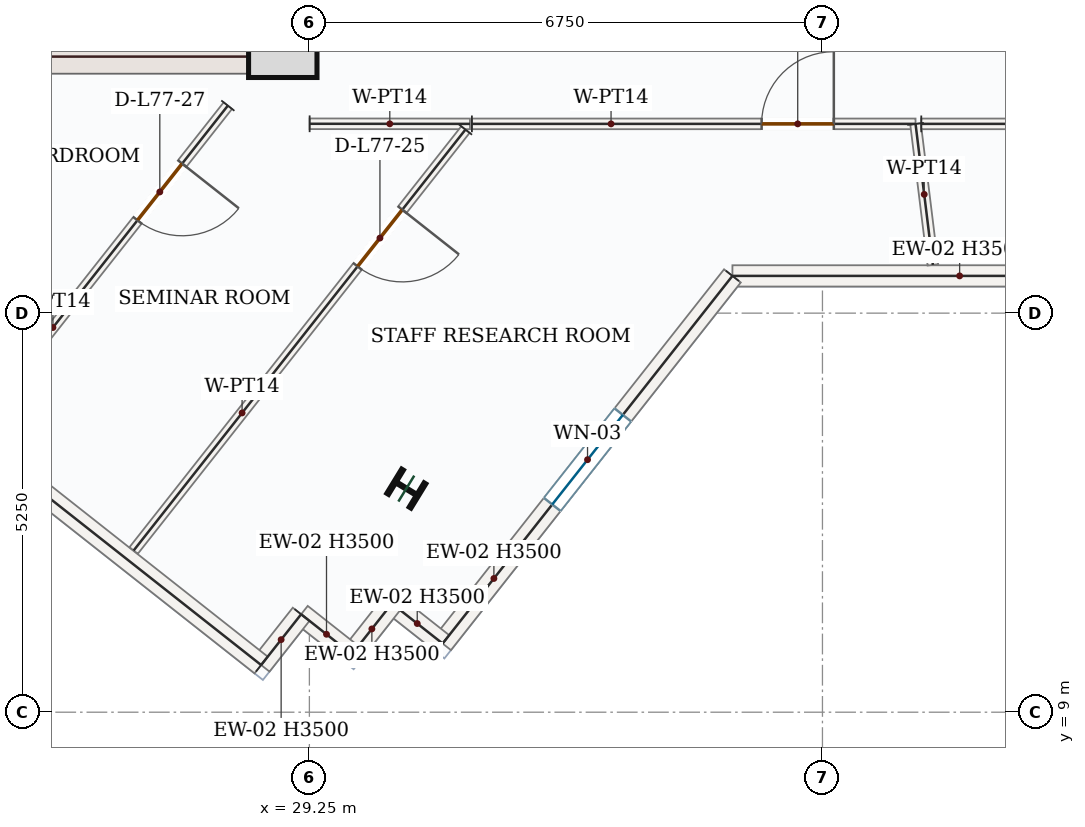
"""IFC4 building model, lengths in metres.
Left out: names, types, materials, properties, quantities, classifications, styles, units other than length and angle.
Written with IfcOpenShell. Run it as: python <this file> out.ifc"""

import sys

from ifc_helpers import new_model, si_unit, direction, frame, frame_2d, origin, origin_2d, place, context, subcontext, project, spatial, rectangle, i_section, extrude, source, transform, mapped, element, fill, save


model = new_model("IFC4")
c1 = context("Model", 3, precision=1e-05, world=origin(), true_north=direction((0.0, 1.0)))
c2 = subcontext(c1, "Body", "Model", "MODEL_VIEW")
j1 = project(units=[si_unit("LENGTHUNIT", "METRE"), si_unit("PLANEANGLEUNIT", "RADIAN")], contexts=[c1])
p1 = place(None, origin())
s1 = spatial("IfcSite", under=j1, at=p1, CompositionType="ELEMENT")
p2 = place(p1, origin())
s2 = spatial("IfcBuilding", under=s1, at=p2, CompositionType="ELEMENT")
p3 = place(p2, frame((0.0, 0.0, 319.8)))
s3 = spatial("IfcBuildingStorey", under=s2, at=p3, CompositionType="ELEMENT", Elevation=319.8)
p4 = place(p3, frame((29.025, 17.4, 0.0), z_axis=(0.0, 0.0, 1.0), x_axis=(0.0, 1.0, 0.0)))
e1 = element("IfcWall", 1, at=p4, inside=s3, PredefinedType="SHEAR", context=c2, shape_type="SweptSolid", body=[
    extrude(rectangle(XDim=8.55, YDim=0.45, at=frame_2d((4.275, 0.0))), origin(), (0.0, 0.0, 1.0), 3.5),
])
p5 = place(p4, frame((6.65, 0.0, 0.0)))
e2 = element("IfcOpeningElement", 2, at=p5, cuts=e1, PredefinedType="OPENING", context=c2, shape_type="SweptSolid", body=[
    extrude(rectangle(XDim=1.1, YDim=2.2, at=frame_2d((0.55, 1.1))), frame((0.0, 0.235, 0.0), z_axis=(0.0, -1.0, 0.0), x_axis=(1.0, 0.0, 0.0)), (0.0, 0.0, 1.0), 0.47),
])
p6 = place(p4, frame((3.15, 0.0, 0.0)))
e3 = element("IfcOpeningElement", 3, at=p6, cuts=e1, PredefinedType="OPENING", context=c2, shape_type="SweptSolid", body=[
    extrude(rectangle(XDim=0.88, YDim=2.1, at=frame_2d((0.44, 1.05))), frame((0.0, 0.235, 0.0), z_axis=(0.0, -1.0, 0.0), x_axis=(1.0, 0.0, 0.0)), (0.0, 0.0, 1.0), 0.47),
])
m1 = source(origin(), c2, "Body", "SweptSolid", [
    extrude(rectangle(XDim=7.1, YDim=0.45, at=frame_2d((3.55, 0.0))), origin(), (0.0, 0.0, 1.0), 3.5),
])
p7 = place(p3, frame((21.7, 17.625, 0.0), z_axis=(0.0, 0.0, 1.0), x_axis=(1.0, 0.0, 0.0)))
e4 = element("IfcWall", 4, at=p7, inside=s3, PredefinedType="SHEAR", context=c2, shape_type="MappedRepresentation", body=[
    mapped(m1, transform((0.0, 0.0, 0.0), x_axis=(1.0, 0.0, 0.0), y_axis=(0.0, 1.0, 0.0), z_axis=(0.0, 0.0, 1.0), scale=1.0)),
])
m2 = source(origin(), c2, "Body", "SweptSolid", [
    extrude(rectangle(XDim=0.9, YDim=0.9, at=origin_2d()), origin(), (0.0, 0.0, 1.0), 3.75),
])
p8 = place(p3, frame((28.9, 17.8, 0.0), z_axis=(0.0, 0.0, 1.0), x_axis=(1.0, 0.0, 0.0)))
e5 = element("IfcColumn", 5, at=p8, inside=s3, PredefinedType="COLUMN", context=c2, shape_type="MappedRepresentation", body=[
    mapped(m2, transform((0.0, 0.0, 0.0), x_axis=(1.0, 0.0, 0.0), y_axis=(0.0, 1.0, 0.0), z_axis=(0.0, 0.0, 1.0), scale=1.0)),
])
m3 = source(origin(), c2, "Body", "SweptSolid", [
    extrude(i_section(OverallWidth=0.374, OverallDepth=0.372, WebThickness=0.016, FlangeThickness=0.026, FilletRadius=0.018, at=origin_2d()), origin(), (0.0, 0.0, 1.0), 3.75),
])
p9 = place(p3, frame((30.525, 11.942, 0.0), z_axis=(0.0, 0.0, 1.0), x_axis=(0.522498564716, 0.852640164354, 0.0)))
e6 = element("IfcColumn", 6, at=p9, inside=s3, PredefinedType="COLUMN", context=c2, shape_type="MappedRepresentation", body=[
    mapped(m3, transform((0.0, 0.0, 0.0), x_axis=(1.0, 0.0, 0.0), y_axis=(0.0, 1.0, 0.0), z_axis=(0.0, 0.0, 1.0), scale=1.0)),
])
m4 = source(origin(), c2, "Body", "SweptSolid", [
    extrude(rectangle(XDim=5.978, YDim=0.28, at=frame_2d((2.989, 0.0))), origin(), (0.0, 0.0, 1.0), 3.5),
])
p10 = place(p3, frame((40.794, 14.74, 0.0), z_axis=(0.0, 0.0, 1.0), x_axis=(-1.0, 0.0, 0.0)))
e7 = element("IfcWall", 7, at=p10, inside=s3, PredefinedType="SOLIDWALL", context=c2, shape_type="MappedRepresentation", body=[
    mapped(m4, transform((0.0, 0.0, 0.0), x_axis=(1.0, 0.0, 0.0), y_axis=(0.0, 1.0, 0.0), z_axis=(0.0, 0.0, 1.0), scale=1.0)),
])
p11 = place(p3, frame((34.816, 14.74, 0.0), z_axis=(0.0, 0.0, 1.0), x_axis=(-0.619100474058, -0.78531178714, 0.0)))
e8 = element("IfcWall", 8, at=p11, inside=s3, PredefinedType="SOLIDWALL", context=c2, shape_type="SweptSolid", body=[
    extrude(rectangle(XDim=6.159, YDim=0.28, at=frame_2d((3.08, 0.0))), origin(), (0.0, 0.0, 1.0), 3.5),
])
p12 = place(p11, frame((2.329, 0.0, 0.85)))
e9 = element("IfcOpeningElement", 9, at=p12, cuts=e8, PredefinedType="OPENING", context=c2, shape_type="SweptSolid", body=[
    extrude(rectangle(XDim=1.5, YDim=1.5, at=frame_2d((0.75, 0.75))), frame((0.0, 0.15, 0.0), z_axis=(0.0, -1.0, 0.0), x_axis=(1.0, 0.0, 0.0)), (0.0, 0.0, 1.0), 0.3),
])
m5 = source(origin(), c2, "Body", "SweptSolid", [
    extrude(rectangle(XDim=0.85, YDim=0.28, at=frame_2d((0.425, 0.0))), origin(), (0.0, 0.0, 1.0), 3.5),
])
p13 = place(p3, frame((31.003, 9.903, 0.0), z_axis=(0.0, 0.0, 1.0), x_axis=(-0.785220826193, 0.619215838066, 0.0)))
e10 = element("IfcWall", 10, at=p13, inside=s3, PredefinedType="SOLIDWALL", context=c2, shape_type="MappedRepresentation", body=[
    mapped(m5, transform((0.0, 0.0, 0.0), x_axis=(1.0, 0.0, 0.0), y_axis=(0.0, 1.0, 0.0), z_axis=(0.0, 0.0, 1.0), scale=1.0)),
])
m6 = source(origin(), c2, "Body", "SweptSolid", [
    extrude(rectangle(XDim=0.85, YDim=0.28, at=frame_2d((0.425, 0.0))), origin(), (0.0, 0.0, 1.0), 3.5),
])
for number, where, z_axis, x_axis in (
    (11, (30.335, 10.43, 0.0), (0.0, 0.0, 1.0), (-0.619, -0.785, 0.0)),
    (12, (29.809, 9.762, 0.0), (0.0, 0.0, 1.0), (-0.785, 0.619, 0.0)),
):
    element("IfcWall", number, at=place(p3, frame(where, z_axis=z_axis, x_axis=x_axis)), inside=s3, PredefinedType="SOLIDWALL", context=c2, shape_type="MappedRepresentation", body=[
        mapped(m6, transform((0.0, 0.0, 0.0), x_axis=(1.0, 0.0, 0.0), y_axis=(0.0, 1.0, 0.0), z_axis=(0.0, 0.0, 1.0), scale=1.0)),
    ])
p14 = place(p3, frame((29.142, 10.288, 0.0), z_axis=(0.0, 0.0, 1.0), x_axis=(-0.619215838066, -0.785220826193, 0.0)))
e13 = element("IfcWall", 13, at=p14, inside=s3, PredefinedType="SOLIDWALL", context=c2, shape_type="MappedRepresentation", body=[
    mapped(m5, transform((0.0, 0.0, 0.0), x_axis=(1.0, 0.0, 0.0), y_axis=(0.0, 1.0, 0.0), z_axis=(0.0, 0.0, 1.0), scale=1.0)),
])
m7 = source(origin(), c2, "Body", "SweptSolid", [
    extrude(rectangle(XDim=9.92, YDim=0.28, at=frame_2d((4.96, 0.0))), origin(), (0.0, 0.0, 1.0), 3.5),
])
p15 = place(p3, frame((28.615, 9.621, 0.0), z_axis=(0.0, 0.0, 1.0), x_axis=(-0.785317257435, 0.619093535077, 0.0)))
e14 = element("IfcWall", 14, at=p15, inside=s3, PredefinedType="SOLIDWALL", context=c2, shape_type="MappedRepresentation", body=[
    mapped(m7, transform((0.0, 0.0, 0.0), x_axis=(1.0, 0.0, 0.0), y_axis=(0.0, 1.0, 0.0), z_axis=(0.0, 0.0, 1.0), scale=1.0)),
])
p16 = place(p3, frame((28.177, 16.98, 0.0), z_axis=(0.0, 0.0, 1.0), x_axis=(-0.619105408422, -0.785307897109, 0.0)))
e15 = element("IfcWall", 15, at=p16, inside=s3, PredefinedType="PARTITIONING", context=c2, shape_type="SweptSolid", body=[
    extrude(rectangle(XDim=5.363, YDim=0.14, at=frame_2d((2.682, 0.0))), origin(), (0.0, 0.0, 1.0), 3.5),
])
p17 = place(p16, frame((0.971, 0.0, 0.0)))
e16 = element("IfcOpeningElement", 16, at=p17, cuts=e15, PredefinedType="OPENING", context=c2, shape_type="SweptSolid", body=[
    extrude(rectangle(XDim=0.95, YDim=2.15, at=frame_2d((0.475, 1.075))), frame((0.0, 0.08, 0.0), z_axis=(0.0, -1.0, 0.0), x_axis=(1.0, 0.0, 0.0)), (0.0, 0.0, 1.0), 0.16),
])
m8 = source(origin(), c2, "Body", "SweptSolid", [
    extrude(rectangle(XDim=2.109, YDim=0.14, at=frame_2d((1.054, 0.0))), origin(), (0.0, 0.0, 1.0), 3.5),
])
p18 = place(p3, frame((29.253, 16.741, 0.0), z_axis=(0.0, 0.0, 1.0), x_axis=(0.999999832474, -0.000578837597, 0.0)))
e17 = element("IfcWall", 17, at=p18, inside=s3, PredefinedType="PARTITIONING", context=c2, shape_type="MappedRepresentation", body=[
    mapped(m8, transform((0.0, 0.0, 0.0), x_axis=(1.0, 0.0, 0.0), y_axis=(0.0, 1.0, 0.0), z_axis=(0.0, 0.0, 1.0), scale=1.0)),
])
p19 = place(p3, frame((31.303, 16.665, 0.0), z_axis=(0.0, 0.0, 1.0), x_axis=(-0.619105259882, -0.785308014213, 0.0)))
e18 = element("IfcWall", 18, at=p19, inside=s3, PredefinedType="PARTITIONING", context=c2, shape_type="SweptSolid", body=[
    extrude(rectangle(XDim=7.051, YDim=0.14, at=frame_2d((3.525, 0.0))), origin(), (0.0, 0.0, 1.0), 3.5),
])
p20 = place(p19, frame((1.342, 0.0, 0.0)))
e19 = element("IfcOpeningElement", 19, at=p20, cuts=e18, PredefinedType="OPENING", context=c2, shape_type="SweptSolid", body=[
    extrude(rectangle(XDim=0.95, YDim=2.15, at=frame_2d((0.475, 1.075))), frame((0.0, 0.08, 0.0), z_axis=(0.0, -1.0, 0.0), x_axis=(1.0, 0.0, 0.0)), (0.0, 0.0, 1.0), 0.16),
])
p21 = place(p3, frame((31.388, 16.74, 0.0), z_axis=(0.0, 0.0, 1.0), x_axis=(1.0, 0.0, 0.0)))
e20 = element("IfcWall", 20, at=p21, inside=s3, PredefinedType="PARTITIONING", context=c2, shape_type="SweptSolid", body=[
    extrude(rectangle(XDim=5.837, YDim=0.14, at=frame_2d((2.918, 0.0))), origin(), (0.0, 0.0, 1.0), 3.5),
])
p22 = place(p21, frame((3.812, 0.0, 0.0)))
e21 = element("IfcOpeningElement", 21, at=p22, cuts=e20, PredefinedType="OPENING", context=c2, shape_type="SweptSolid", body=[
    extrude(rectangle(XDim=0.95, YDim=2.15, at=frame_2d((0.475, 1.075))), frame((0.0, 0.08, 0.0), z_axis=(0.0, -1.0, 0.0), x_axis=(1.0, 0.0, 0.0)), (0.0, 0.0, 1.0), 0.16),
])
m9 = source(origin(), c2, "Body", "SweptSolid", [
    extrude(rectangle(XDim=1.869, YDim=0.14, at=frame_2d((0.934, 0.0))), origin(), (0.0, 0.0, 1.0), 3.5),
])
p23 = place(p3, frame((37.225, 16.74, 0.0), z_axis=(0.0, 0.0, 1.0), x_axis=(0.122153221409, -0.992511254596, 0.0)))
e22 = element("IfcWall", 22, at=p23, inside=s3, PredefinedType="PARTITIONING", context=c2, shape_type="MappedRepresentation", body=[
    mapped(m9, transform((0.0, 0.0, 0.0), x_axis=(1.0, 0.0, 0.0), y_axis=(0.0, 1.0, 0.0), z_axis=(0.0, 0.0, 1.0), scale=1.0)),
])
m10 = source(origin(), c2, "Body", "SweptSolid", [
    extrude(rectangle(XDim=5.444, YDim=0.14, at=frame_2d((2.722, 0.0))), origin(), (0.0, 0.0, 1.0), 3.5),
])
p24 = place(p3, frame((37.3, 16.74, 0.0), z_axis=(0.0, 0.0, 1.0), x_axis=(1.0, 0.0, 0.0)))
e23 = element("IfcWall", 23, at=p24, inside=s3, PredefinedType="PARTITIONING", context=c2, shape_type="MappedRepresentation", body=[
    mapped(m10, transform((0.0, 0.0, 0.0), x_axis=(1.0, 0.0, 0.0), y_axis=(0.0, 1.0, 0.0), z_axis=(0.0, 0.0, 1.0), scale=1.0)),
])
m11 = source(origin(), c2, "Body", "SweptSolid", [
    extrude(rectangle(XDim=1.5, YDim=1.5, at=frame_2d((0.75, 0.75))), frame((0.0, 0.03, 0.0), z_axis=(0.0, -1.0, 0.0), x_axis=(1.0, 0.0, 0.0)), (0.0, 0.0, 1.0), 0.06),
])
p25 = place(p12, origin())
e24 = element("IfcWindow", 24, at=p25, inside=s3, PartitioningType="SINGLE_PANEL", PredefinedType="WINDOW", context=c2, shape_type="MappedRepresentation", body=[
    mapped(m11, transform((0.0, 0.0, 0.0), x_axis=(1.0, 0.0, 0.0), y_axis=(0.0, 1.0, 0.0), z_axis=(0.0, 0.0, 1.0), scale=1.0)),
])
fill(e9, e24)
m12 = source(origin(), c2, "Body", "SweptSolid", [
    extrude(rectangle(XDim=0.95, YDim=2.15, at=frame_2d((0.475, 1.075))), frame((0.0, 0.025, 0.0), z_axis=(0.0, -1.0, 0.0), x_axis=(1.0, 0.0, 0.0)), (0.0, 0.0, 1.0), 0.05),
])
p26 = place(p22, origin())
e25 = element("IfcDoor", 25, at=p26, inside=s3, OperationType="SINGLE_SWING_RIGHT", PredefinedType="DOOR", context=c2, shape_type="MappedRepresentation", body=[
    mapped(m12, transform((0.0, 0.0, 0.0), x_axis=(1.0, 0.0, 0.0), y_axis=(0.0, 1.0, 0.0), z_axis=(0.0, 0.0, 1.0), scale=1.0)),
])
fill(e21, e25)
p27 = place(p20, origin())
e26 = element("IfcDoor", 26, at=p27, inside=s3, OperationType="SINGLE_SWING_LEFT", PredefinedType="DOOR", context=c2, shape_type="MappedRepresentation", body=[
    mapped(m12, transform((0.0, 0.0, 0.0), x_axis=(1.0, 0.0, 0.0), y_axis=(0.0, 1.0, 0.0), z_axis=(0.0, 0.0, 1.0), scale=1.0)),
])
fill(e19, e26)
p28 = place(p17, origin())
e27 = element("IfcDoor", 27, at=p28, inside=s3, OperationType="SINGLE_SWING_LEFT", PredefinedType="DOOR", context=c2, shape_type="MappedRepresentation", body=[
    mapped(m12, transform((0.0, 0.0, 0.0), x_axis=(1.0, 0.0, 0.0), y_axis=(0.0, 1.0, 0.0), z_axis=(0.0, 0.0, 1.0), scale=1.0)),
])
fill(e16, e27)
save(model, sys.argv[1])
